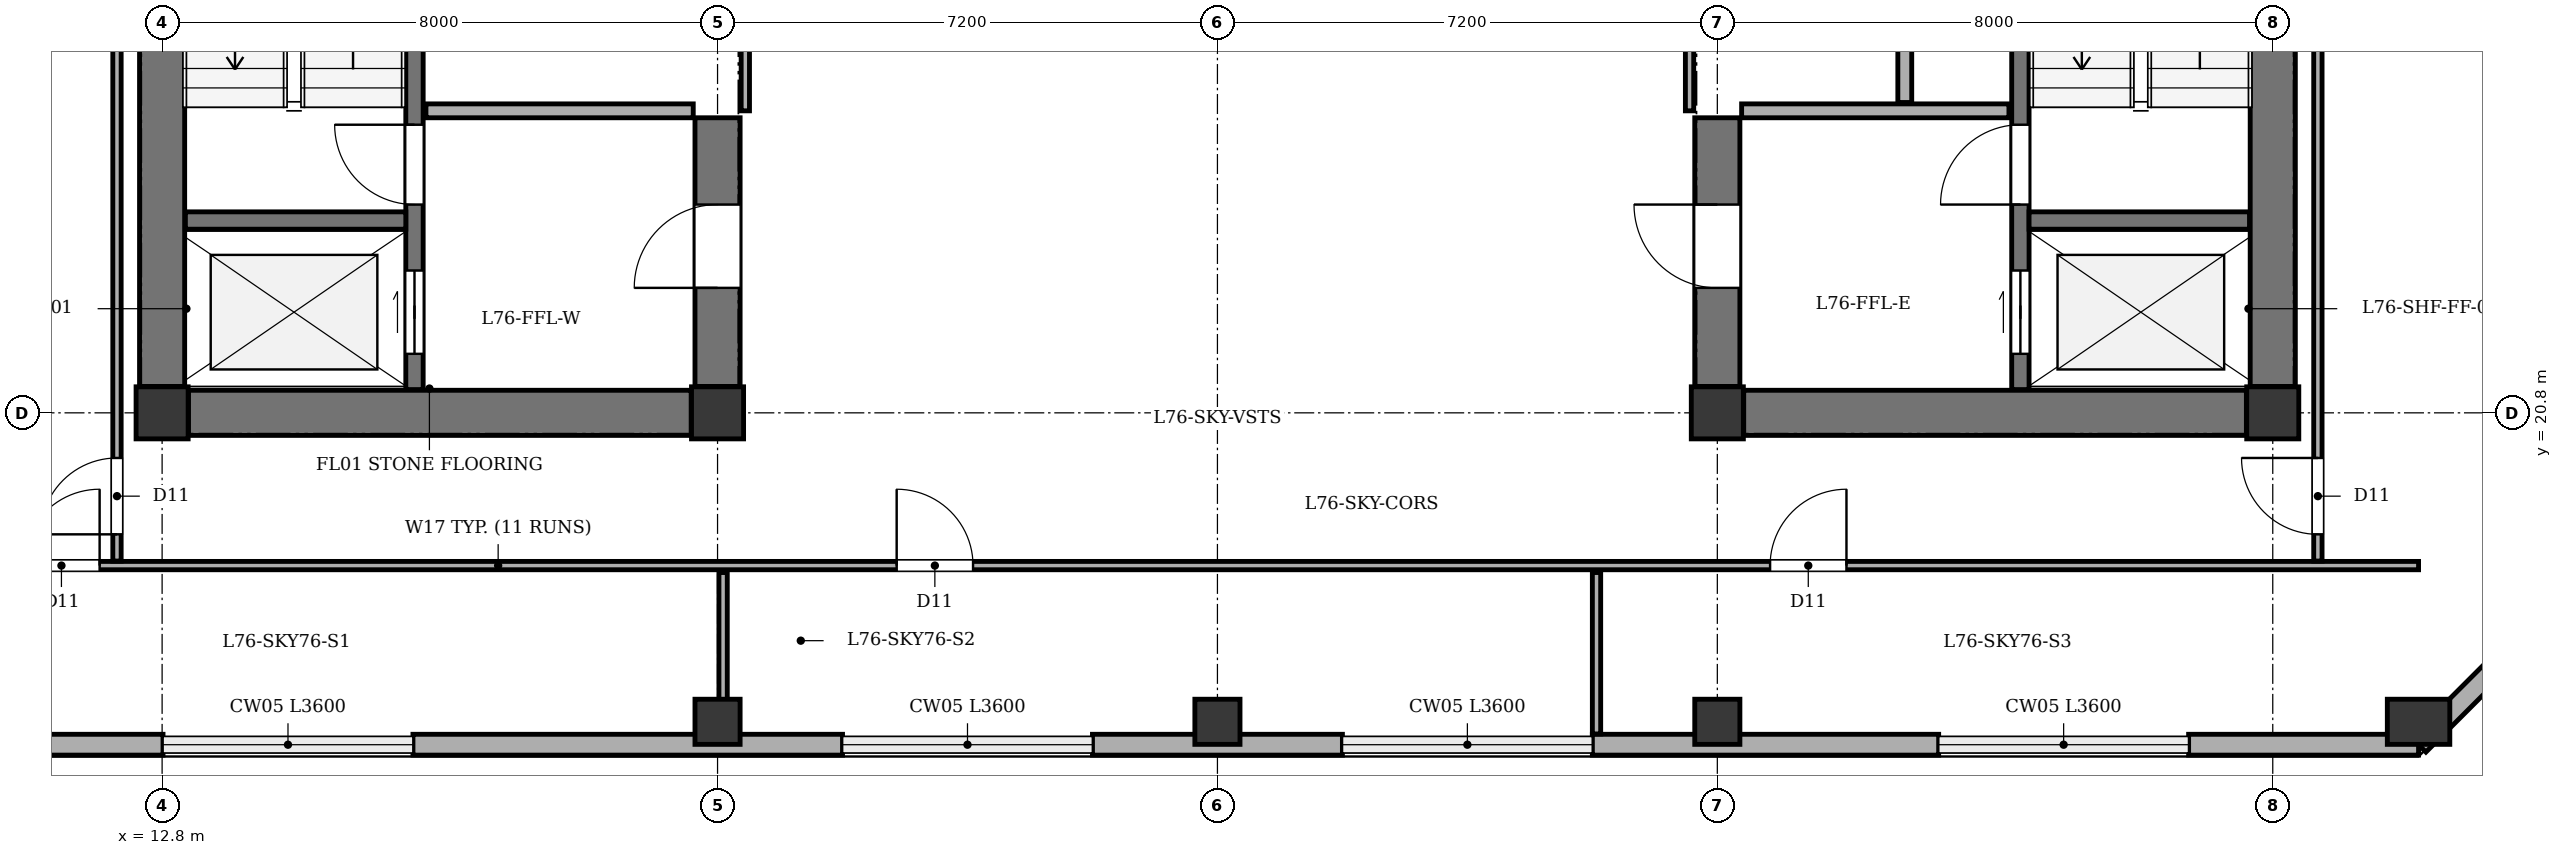
"""IFC4 building model, lengths in metres.
Left out: names, types, materials, properties, quantities, classifications, styles, units other than length and angle.
Written with IfcOpenShell. Run it as: python <this file> out.ifc"""

import sys

from ifc_helpers import new_model, si_unit, direction, frame, frame_2d, origin, origin_2d, place, context, subcontext, project, spatial, rectangle, extrude, element, fill, save


model = new_model("IFC4")
c1 = context("Model", 3, precision=1e-05, world=origin(), true_north=direction((0.0, 1.0)))
c2 = subcontext(c1, "Body", "Model", "MODEL_VIEW")
j1 = project(units=[si_unit("LENGTHUNIT", "METRE"), si_unit("PLANEANGLEUNIT", "RADIAN")], contexts=[c1])
p1 = place(None, origin())
s1 = spatial("IfcSite", under=j1, at=p1, CompositionType="ELEMENT")
p2 = place(p1, origin())
s2 = spatial("IfcBuilding", under=s1, at=p2, CompositionType="ELEMENT")
p3 = place(p2, frame((0.0, 0.0, 287.4)))
s3 = spatial("IfcBuildingStorey", under=s2, at=p3, CompositionType="ELEMENT", Elevation=287.4)
for number, where, z_axis, x_axis in (
    (1, (12.8, 20.8, 0.0), (0.0, 0.0, 1.0), (1.0, 0.0, 0.0)),
    (2, (20.8, 20.8, 0.0), (0.0, 0.0, 1.0), (1.0, 0.0, 0.0)),
    (3, (35.2, 20.8, 0.0), (0.0, 0.0, 1.0), (1.0, 0.0, 0.0)),
    (4, (43.2, 20.8, 0.0), (0.0, 0.0, 1.0), (1.0, 0.0, 0.0)),
):
    element("IfcColumn", number, at=place(p3, frame(where, z_axis=z_axis, x_axis=x_axis)), inside=s3, PredefinedType="COLUMN", context=c2, shape_type="SweptSolid", body=[
        extrude(rectangle(XDim=0.75, YDim=0.75, at=origin_2d()), origin(), (0.0, 0.0, 1.0), 4.8),
    ])
for number, where, z_axis, x_axis in (
    (5, (20.8, 16.35, 0.0), (0.0, 0.0, 1.0), (1.0, 0.0, 0.0)),
    (6, (28.0, 16.35, 0.0), (0.0, 0.0, 1.0), (1.0, 0.0, 0.0)),
    (7, (35.2, 16.35, 0.0), (0.0, 0.0, 1.0), (1.0, 0.0, 0.0)),
):
    element("IfcColumn", number, at=place(p3, frame(where, z_axis=z_axis, x_axis=x_axis)), inside=s3, PredefinedType="COLUMN", context=c2, shape_type="SweptSolid", body=[
        extrude(rectangle(XDim=0.65, YDim=0.65, at=origin_2d()), origin(), (0.0, 0.0, 1.0), 4.8),
    ])
p4 = place(p3, frame((45.3, 16.35, 0.0), z_axis=(0.0, 0.0, 1.0), x_axis=(1.0, 0.0, 0.0)))
e8 = element("IfcColumn", 8, at=p4, inside=s3, PredefinedType="COLUMN", context=c2, shape_type="SweptSolid", body=[
    extrude(rectangle(XDim=0.65, YDim=0.9, at=origin_2d()), origin(), (0.0, 0.0, 1.0), 4.8),
])
p5 = place(p3, frame((45.3, 16.02, 0.0), z_axis=(0.0, 0.0, 1.0), x_axis=(-1.0, 0.0, 0.0)))
e9 = element("IfcWall", 9, at=p5, inside=s3, PredefinedType="STANDARD", context=c2, shape_type="SweptSolid", body=[
    extrude(rectangle(XDim=3.312, YDim=0.3, at=frame_2d((1.656, 0.0))), origin(), (0.0, 0.0, 1.0), 3.735),
])
p6 = place(p3, frame((38.388, 16.02, 0.0), z_axis=(0.0, 0.0, 1.0), x_axis=(-1.0, 0.0, 0.0)))
e10 = element("IfcWall", 10, at=p6, inside=s3, PredefinedType="STANDARD", context=c2, shape_type="SweptSolid", body=[
    extrude(rectangle(XDim=4.988, YDim=0.3, at=frame_2d((2.494, 0.0))), origin(), (0.0, 0.0, 1.0), 3.735),
])
p7 = place(p3, frame((29.8, 16.02, 0.0), z_axis=(0.0, 0.0, 1.0), x_axis=(-1.0, 0.0, 0.0)))
e11 = element("IfcWall", 11, at=p7, inside=s3, PredefinedType="STANDARD", context=c2, shape_type="SweptSolid", body=[
    extrude(rectangle(XDim=3.6, YDim=0.3, at=frame_2d((1.8, 0.0))), origin(), (0.0, 0.0, 1.0), 3.735),
])
p8 = place(p3, frame((22.6, 16.02, 0.0), z_axis=(0.0, 0.0, 1.0), x_axis=(-1.0, 0.0, 0.0)))
e12 = element("IfcWall", 12, at=p8, inside=s3, PredefinedType="STANDARD", context=c2, shape_type="SweptSolid", body=[
    extrude(rectangle(XDim=6.187, YDim=0.3, at=frame_2d((3.094, 0.0))), origin(), (0.0, 0.0, 1.0), 3.735),
])
p9 = place(p3, frame((12.813, 16.02, 0.0), z_axis=(0.0, 0.0, 1.0), x_axis=(-1.0, 0.0, 0.0)))
e13 = element("IfcWall", 13, at=p9, inside=s3, PredefinedType="STANDARD", context=c2, shape_type="SweptSolid", body=[
    extrude(rectangle(XDim=4.513, YDim=0.3, at=frame_2d((2.256, 0.0))), origin(), (0.0, 0.0, 1.0), 3.735),
])
p10 = place(p3, frame((49.13, 19.85, 0.0), z_axis=(0.0, 0.0, 1.0), x_axis=(-0.707084243559, -0.707129318095, 0.0)))
e14 = element("IfcWall", 14, at=p10, inside=s3, PredefinedType="STANDARD", context=c2, shape_type="SweptSolid", body=[
    extrude(rectangle(XDim=5.416, YDim=0.3, at=frame_2d((2.708, 0.0))), origin(), (0.0, 0.0, 1.0), 3.735),
])
p11 = place(p3, frame((12.8, 21.18, 0.0), z_axis=(0.0, 0.0, 1.0), x_axis=(0.0, 1.0, 0.0)))
e15 = element("IfcWall", 15, at=p11, inside=s3, PredefinedType="SHEAR", context=c2, shape_type="SweptSolid", body=[
    extrude(rectangle(XDim=12.04, YDim=0.65, at=frame_2d((6.02, 0.0))), origin(), (0.0, 0.0, 1.0), 4.35),
])
p12 = place(p3, frame((13.18, 20.8, 0.0), z_axis=(0.0, 0.0, 1.0), x_axis=(1.0, 0.0, 0.0)))
e16 = element("IfcWall", 16, at=p12, inside=s3, PredefinedType="SHEAR", context=c2, shape_type="SweptSolid", body=[
    extrude(rectangle(XDim=7.24, YDim=0.65, at=frame_2d((3.62, 0.0))), origin(), (0.0, 0.0, 1.0), 4.35),
])
p13 = place(p3, frame((20.8, 21.18, 0.0), z_axis=(0.0, 0.0, 1.0), x_axis=(0.0, 1.0, 0.0)))
e17 = element("IfcWall", 17, at=p13, inside=s3, PredefinedType="SHEAR", context=c2, shape_type="SweptSolid", body=[
    extrude(rectangle(XDim=3.87, YDim=0.65, at=frame_2d((1.935, 0.0))), origin(), (0.0, 0.0, 1.0), 4.35),
])
p14 = place(p13, frame((1.42, 0.0, 0.0)))
e18 = element("IfcOpeningElement", 18, at=p14, cuts=e17, PredefinedType="OPENING", context=c2, shape_type="SweptSolid", body=[
    extrude(rectangle(XDim=1.2, YDim=2.15, at=frame_2d((0.6, 1.075))), frame((0.0, 0.335, 0.0), z_axis=(0.0, -1.0, 0.0), x_axis=(1.0, 0.0, 0.0)), (0.0, 0.0, 1.0), 0.67),
])
p15 = place(p3, frame((16.435, 21.135, 0.0), z_axis=(0.0, 0.0, 1.0), x_axis=(0.0, 1.0, 0.0)))
e19 = element("IfcWall", 19, at=p15, inside=s3, PredefinedType="SHEAR", context=c2, shape_type="SweptSolid", body=[
    extrude(rectangle(XDim=12.13, YDim=0.25, at=frame_2d((6.065, 0.0))), origin(), (0.0, 0.0, 1.0), 4.35),
])
p16 = place(p15, frame((0.515, 0.0, 0.0)))
e20 = element("IfcOpeningElement", 20, at=p16, cuts=e19, PredefinedType="OPENING", context=c2, shape_type="SweptSolid", body=[
    extrude(rectangle(XDim=1.2, YDim=2.15, at=frame_2d((0.6, 1.075))), frame((0.0, 0.135, 0.0), z_axis=(0.0, -1.0, 0.0), x_axis=(1.0, 0.0, 0.0)), (0.0, 0.0, 1.0), 0.27),
])
p17 = place(p15, frame((2.665, 0.0, 0.0)))
e21 = element("IfcOpeningElement", 21, at=p17, cuts=e19, PredefinedType="OPENING", context=c2, shape_type="SweptSolid", body=[
    extrude(rectangle(XDim=1.15, YDim=2.15, at=frame_2d((0.575, 1.075))), frame((0.0, 0.135, 0.0), z_axis=(0.0, -1.0, 0.0), x_axis=(1.0, 0.0, 0.0)), (0.0, 0.0, 1.0), 0.27),
])
p18 = place(p3, frame((13.135, 23.57, 0.0), z_axis=(0.0, 0.0, 1.0), x_axis=(1.0, 0.0, 0.0)))
e22 = element("IfcWall", 22, at=p18, inside=s3, PredefinedType="SHEAR", context=c2, shape_type="SweptSolid", body=[
    extrude(rectangle(XDim=3.175, YDim=0.25, at=frame_2d((1.587, 0.0))), origin(), (0.0, 0.0, 1.0), 4.35),
])
p19 = place(p3, frame((16.6, 25.15, 0.0), z_axis=(0.0, 0.0, 1.0), x_axis=(1.0, 0.0, 0.0)))
e23 = element("IfcWall", 23, at=p19, inside=s3, PredefinedType="SOLIDWALL", context=c2, shape_type="SweptSolid", body=[
    extrude(rectangle(XDim=3.85, YDim=0.2, at=frame_2d((1.925, 0.0))), origin(), (0.0, 0.0, 1.0), 4.35),
])
p20 = place(p3, frame((43.2, 21.18, 0.0), z_axis=(0.0, 0.0, 1.0), x_axis=(0.0, 1.0, 0.0)))
e24 = element("IfcWall", 24, at=p20, inside=s3, PredefinedType="SHEAR", context=c2, shape_type="SweptSolid", body=[
    extrude(rectangle(XDim=12.04, YDim=0.65, at=frame_2d((6.02, 0.0))), origin(), (0.0, 0.0, 1.0), 4.35),
])
p21 = place(p3, frame((35.58, 20.8, 0.0), z_axis=(0.0, 0.0, 1.0), x_axis=(1.0, 0.0, 0.0)))
e25 = element("IfcWall", 25, at=p21, inside=s3, PredefinedType="SHEAR", context=c2, shape_type="SweptSolid", body=[
    extrude(rectangle(XDim=7.24, YDim=0.65, at=frame_2d((3.62, 0.0))), origin(), (0.0, 0.0, 1.0), 4.35),
])
p22 = place(p3, frame((35.2, 21.18, 0.0), z_axis=(0.0, 0.0, 1.0), x_axis=(0.0, 1.0, 0.0)))
e26 = element("IfcWall", 26, at=p22, inside=s3, PredefinedType="SHEAR", context=c2, shape_type="SweptSolid", body=[
    extrude(rectangle(XDim=3.87, YDim=0.65, at=frame_2d((1.935, 0.0))), origin(), (0.0, 0.0, 1.0), 4.35),
])
p23 = place(p22, frame((1.42, 0.0, 0.0)))
e27 = element("IfcOpeningElement", 27, at=p23, cuts=e26, PredefinedType="OPENING", context=c2, shape_type="SweptSolid", body=[
    extrude(rectangle(XDim=1.2, YDim=2.15, at=frame_2d((0.6, 1.075))), frame((0.0, 0.335, 0.0), z_axis=(0.0, -1.0, 0.0), x_axis=(1.0, 0.0, 0.0)), (0.0, 0.0, 1.0), 0.67),
])
p24 = place(p3, frame((39.565, 21.135, 0.0), z_axis=(0.0, 0.0, 1.0), x_axis=(0.0, 1.0, 0.0)))
e28 = element("IfcWall", 28, at=p24, inside=s3, PredefinedType="SHEAR", context=c2, shape_type="SweptSolid", body=[
    extrude(rectangle(XDim=12.13, YDim=0.25, at=frame_2d((6.065, 0.0))), origin(), (0.0, 0.0, 1.0), 4.35),
])
p25 = place(p24, frame((0.515, 0.0, 0.0)))
e29 = element("IfcOpeningElement", 29, at=p25, cuts=e28, PredefinedType="OPENING", context=c2, shape_type="SweptSolid", body=[
    extrude(rectangle(XDim=1.2, YDim=2.15, at=frame_2d((0.6, 1.075))), frame((0.0, 0.135, 0.0), z_axis=(0.0, -1.0, 0.0), x_axis=(1.0, 0.0, 0.0)), (0.0, 0.0, 1.0), 0.27),
])
p26 = place(p24, frame((2.665, 0.0, 0.0)))
e30 = element("IfcOpeningElement", 30, at=p26, cuts=e28, PredefinedType="OPENING", context=c2, shape_type="SweptSolid", body=[
    extrude(rectangle(XDim=1.15, YDim=2.15, at=frame_2d((0.575, 1.075))), frame((0.0, 0.135, 0.0), z_axis=(0.0, -1.0, 0.0), x_axis=(1.0, 0.0, 0.0)), (0.0, 0.0, 1.0), 0.27),
])
p27 = place(p3, frame((39.69, 23.57, 0.0), z_axis=(0.0, 0.0, 1.0), x_axis=(1.0, 0.0, 0.0)))
e31 = element("IfcWall", 31, at=p27, inside=s3, PredefinedType="SHEAR", context=c2, shape_type="SweptSolid", body=[
    extrude(rectangle(XDim=3.175, YDim=0.25, at=frame_2d((1.587, 0.0))), origin(), (0.0, 0.0, 1.0), 4.35),
])
p28 = place(p3, frame((35.55, 25.15, 0.0), z_axis=(0.0, 0.0, 1.0), x_axis=(1.0, 0.0, 0.0)))
e32 = element("IfcWall", 32, at=p28, inside=s3, PredefinedType="SOLIDWALL", context=c2, shape_type="SweptSolid", body=[
    extrude(rectangle(XDim=3.85, YDim=0.2, at=frame_2d((1.925, 0.0))), origin(), (0.0, 0.0, 1.0), 4.35),
])
p29 = place(p3, frame((37.9, 25.27, 0.0), z_axis=(0.0, 0.0, 1.0), x_axis=(0.0, 1.0, 0.0)))
e33 = element("IfcWall", 33, at=p29, inside=s3, PredefinedType="SOLIDWALL", context=c2, shape_type="SweptSolid", body=[
    extrude(rectangle(XDim=7.995, YDim=0.2, at=frame_2d((3.998, 0.0))), origin(), (0.0, 0.0, 1.0), 4.35),
])
p30 = place(p3, frame((21.2, 25.15, 0.0), z_axis=(0.0, 0.0, 1.0), x_axis=(0.0, 1.0, 0.0)))
e34 = element("IfcWall", 34, at=p30, inside=s3, PredefinedType="PARTITIONING", context=c2, shape_type="SweptSolid", body=[
    extrude(rectangle(XDim=5.95, YDim=0.12, at=frame_2d((2.975, 0.0))), origin(), (0.0, 0.0, 1.0), 4.35),
])
p31 = place(p30, frame((2.2, 0.0, 0.0)))
e35 = element("IfcOpeningElement", 35, at=p31, cuts=e34, PredefinedType="OPENING", context=c2, shape_type="SweptSolid", body=[
    extrude(rectangle(XDim=1.0, YDim=2.1, at=frame_2d((0.5, 1.05))), frame((0.0, 0.07, 0.0), z_axis=(0.0, -1.0, 0.0), x_axis=(1.0, 0.0, 0.0)), (0.0, 0.0, 1.0), 0.14),
])
p32 = place(p3, frame((34.8, 25.15, 0.0), z_axis=(0.0, 0.0, 1.0), x_axis=(0.0, 1.0, 0.0)))
e36 = element("IfcWall", 36, at=p32, inside=s3, PredefinedType="PARTITIONING", context=c2, shape_type="SweptSolid", body=[
    extrude(rectangle(XDim=5.95, YDim=0.12, at=frame_2d((2.975, 0.0))), origin(), (0.0, 0.0, 1.0), 4.35),
])
p33 = place(p32, frame((2.2, 0.0, 0.0)))
e37 = element("IfcOpeningElement", 37, at=p33, cuts=e36, PredefinedType="OPENING", context=c2, shape_type="SweptSolid", body=[
    extrude(rectangle(XDim=1.0, YDim=2.1, at=frame_2d((0.5, 1.05))), frame((0.0, 0.07, 0.0), z_axis=(0.0, -1.0, 0.0), x_axis=(1.0, 0.0, 0.0)), (0.0, 0.0, 1.0), 0.14),
])
p34 = place(p3, frame((8.3, 18.6, 0.0), z_axis=(0.0, 0.0, 1.0), x_axis=(1.0, 0.0, 0.0)))
e38 = element("IfcWall", 38, at=p34, inside=s3, PredefinedType="PARTITIONING", context=c2, shape_type="SweptSolid", body=[
    extrude(rectangle(XDim=37.0, YDim=0.12, at=frame_2d((18.5, 0.0))), origin(), (0.0, 0.0, 1.0), 4.35),
])
p35 = place(p34, frame((2.5, 0.0, 0.0)))
e39 = element("IfcOpeningElement", 39, at=p35, cuts=e38, PredefinedType="OPENING", context=c2, shape_type="SweptSolid", body=[
    extrude(rectangle(XDim=1.1, YDim=2.15, at=frame_2d((0.55, 1.075))), frame((0.0, 0.07, 0.0), z_axis=(0.0, -1.0, 0.0), x_axis=(1.0, 0.0, 0.0)), (0.0, 0.0, 1.0), 0.14),
])
p36 = place(p34, frame((15.08, 0.0, 0.0)))
e40 = element("IfcOpeningElement", 40, at=p36, cuts=e38, PredefinedType="OPENING", context=c2, shape_type="SweptSolid", body=[
    extrude(rectangle(XDim=1.1, YDim=2.15, at=frame_2d((0.55, 1.075))), frame((0.0, 0.07, 0.0), z_axis=(0.0, -1.0, 0.0), x_axis=(1.0, 0.0, 0.0)), (0.0, 0.0, 1.0), 0.14),
])
p37 = place(p34, frame((27.66, 0.0, 0.0)))
e41 = element("IfcOpeningElement", 41, at=p37, cuts=e38, PredefinedType="OPENING", context=c2, shape_type="SweptSolid", body=[
    extrude(rectangle(XDim=1.1, YDim=2.15, at=frame_2d((0.55, 1.075))), frame((0.0, 0.07, 0.0), z_axis=(0.0, -1.0, 0.0), x_axis=(1.0, 0.0, 0.0)), (0.0, 0.0, 1.0), 0.14),
])
p38 = place(p3, frame((20.88, 16.175, 0.0), z_axis=(0.0, 0.0, 1.0), x_axis=(0.0, 1.0, 0.0)))
e42 = element("IfcWall", 42, at=p38, inside=s3, PredefinedType="PARTITIONING", context=c2, shape_type="SweptSolid", body=[
    extrude(rectangle(XDim=2.325, YDim=0.12, at=frame_2d((1.163, 0.0))), origin(), (0.0, 0.0, 1.0), 3.535),
])
p39 = place(p3, frame((33.46, 16.175, 0.0), z_axis=(0.0, 0.0, 1.0), x_axis=(0.0, 1.0, 0.0)))
e43 = element("IfcWall", 43, at=p39, inside=s3, PredefinedType="PARTITIONING", context=c2, shape_type="SweptSolid", body=[
    extrude(rectangle(XDim=2.325, YDim=0.12, at=frame_2d((1.163, 0.0))), origin(), (0.0, 0.0, 1.0), 4.35),
])
p40 = place(p3, frame((12.15, 18.665, 0.0), z_axis=(0.0, 0.0, 1.0), x_axis=(0.0, 1.0, 0.0)))
e44 = element("IfcWall", 44, at=p40, inside=s3, PredefinedType="PARTITIONING", context=c2, shape_type="SweptSolid", body=[
    extrude(rectangle(XDim=17.47, YDim=0.12, at=frame_2d((8.735, 0.0))), origin(), (0.0, 0.0, 1.0), 4.35),
])
p41 = place(p40, frame((0.385, 0.0, 0.0)))
e45 = element("IfcOpeningElement", 45, at=p41, cuts=e44, PredefinedType="OPENING", context=c2, shape_type="SweptSolid", body=[
    extrude(rectangle(XDim=1.1, YDim=2.15, at=frame_2d((0.55, 1.075))), frame((0.0, 0.07, 0.0), z_axis=(0.0, -1.0, 0.0), x_axis=(1.0, 0.0, 0.0)), (0.0, 0.0, 1.0), 0.14),
])
p42 = place(p3, frame((43.85, 18.665, 0.0), z_axis=(0.0, 0.0, 1.0), x_axis=(0.0, 1.0, 0.0)))
e46 = element("IfcWall", 46, at=p42, inside=s3, PredefinedType="PARTITIONING", context=c2, shape_type="SweptSolid", body=[
    extrude(rectangle(XDim=17.47, YDim=0.12, at=frame_2d((8.735, 0.0))), origin(), (0.0, 0.0, 1.0), 4.35),
])
p43 = place(p42, frame((0.385, 0.0, 0.0)))
e47 = element("IfcOpeningElement", 47, at=p43, cuts=e46, PredefinedType="OPENING", context=c2, shape_type="SweptSolid", body=[
    extrude(rectangle(XDim=1.1, YDim=2.15, at=frame_2d((0.55, 1.075))), frame((0.0, 0.07, 0.0), z_axis=(0.0, -1.0, 0.0), x_axis=(1.0, 0.0, 0.0)), (0.0, 0.0, 1.0), 0.14),
])
p44 = place(p14, origin())
e48 = element("IfcDoor", 48, at=p44, inside=s3, OperationType="SINGLE_SWING_LEFT", PredefinedType="DOOR", context=c2, shape_type="SweptSolid", body=[
    extrude(rectangle(XDim=1.2, YDim=2.15, at=frame_2d((0.6, 1.075))), frame((0.0, 0.025, 0.0), z_axis=(0.0, -1.0, 0.0), x_axis=(1.0, 0.0, 0.0)), (0.0, 0.0, 1.0), 0.05),
])
fill(e18, e48)
p45 = place(p16, origin())
e49 = element("IfcDoor", 49, at=p45, inside=s3, OperationType="DOUBLE_DOOR_SLIDING", PredefinedType="DOOR", context=c2, shape_type="SweptSolid", body=[
    extrude(rectangle(XDim=1.2, YDim=2.15, at=frame_2d((0.6, 1.075))), frame((0.0, 0.025, 0.0), z_axis=(0.0, -1.0, 0.0), x_axis=(1.0, 0.0, 0.0)), (0.0, 0.0, 1.0), 0.05),
])
fill(e20, e49)
p46 = place(p17, origin())
e50 = element("IfcDoor", 50, at=p46, inside=s3, OperationType="SINGLE_SWING_RIGHT", PredefinedType="DOOR", context=c2, shape_type="SweptSolid", body=[
    extrude(rectangle(XDim=1.15, YDim=2.15, at=frame_2d((0.575, 1.075))), frame((0.0, 0.025, 0.0), z_axis=(0.0, -1.0, 0.0), x_axis=(1.0, 0.0, 0.0)), (0.0, 0.0, 1.0), 0.05),
])
fill(e21, e50)
p47 = place(p23, origin())
e51 = element("IfcDoor", 51, at=p47, inside=s3, OperationType="SINGLE_SWING_RIGHT", PredefinedType="DOOR", context=c2, shape_type="SweptSolid", body=[
    extrude(rectangle(XDim=1.2, YDim=2.15, at=frame_2d((0.6, 1.075))), frame((0.0, 0.025, 0.0), z_axis=(0.0, -1.0, 0.0), x_axis=(1.0, 0.0, 0.0)), (0.0, 0.0, 1.0), 0.05),
])
fill(e27, e51)
p48 = place(p25, origin())
e52 = element("IfcDoor", 52, at=p48, inside=s3, OperationType="DOUBLE_DOOR_SLIDING", PredefinedType="DOOR", context=c2, shape_type="SweptSolid", body=[
    extrude(rectangle(XDim=1.2, YDim=2.15, at=frame_2d((0.6, 1.075))), frame((0.0, 0.025, 0.0), z_axis=(0.0, -1.0, 0.0), x_axis=(1.0, 0.0, 0.0)), (0.0, 0.0, 1.0), 0.05),
])
fill(e29, e52)
p49 = place(p26, origin())
e53 = element("IfcDoor", 53, at=p49, inside=s3, OperationType="SINGLE_SWING_LEFT", PredefinedType="DOOR", context=c2, shape_type="SweptSolid", body=[
    extrude(rectangle(XDim=1.15, YDim=2.15, at=frame_2d((0.575, 1.075))), frame((0.0, 0.025, 0.0), z_axis=(0.0, -1.0, 0.0), x_axis=(1.0, 0.0, 0.0)), (0.0, 0.0, 1.0), 0.05),
])
fill(e30, e53)
p50 = place(p35, origin())
e54 = element("IfcDoor", 54, at=p50, inside=s3, OperationType="SINGLE_SWING_RIGHT", PredefinedType="DOOR", context=c2, shape_type="SweptSolid", body=[
    extrude(rectangle(XDim=1.1, YDim=2.15, at=frame_2d((0.55, 1.075))), frame((0.0, 0.025, 0.0), z_axis=(0.0, -1.0, 0.0), x_axis=(1.0, 0.0, 0.0)), (0.0, 0.0, 1.0), 0.05),
])
fill(e39, e54)
p51 = place(p36, origin())
e55 = element("IfcDoor", 55, at=p51, inside=s3, OperationType="SINGLE_SWING_LEFT", PredefinedType="DOOR", context=c2, shape_type="SweptSolid", body=[
    extrude(rectangle(XDim=1.1, YDim=2.15, at=frame_2d((0.55, 1.075))), frame((0.0, 0.025, 0.0), z_axis=(0.0, -1.0, 0.0), x_axis=(1.0, 0.0, 0.0)), (0.0, 0.0, 1.0), 0.05),
])
fill(e40, e55)
p52 = place(p37, origin())
e56 = element("IfcDoor", 56, at=p52, inside=s3, OperationType="SINGLE_SWING_RIGHT", PredefinedType="DOOR", context=c2, shape_type="SweptSolid", body=[
    extrude(rectangle(XDim=1.1, YDim=2.15, at=frame_2d((0.55, 1.075))), frame((0.0, 0.025, 0.0), z_axis=(0.0, -1.0, 0.0), x_axis=(1.0, 0.0, 0.0)), (0.0, 0.0, 1.0), 0.05),
])
fill(e41, e56)
p53 = place(p41, origin())
e57 = element("IfcDoor", 57, at=p53, inside=s3, OperationType="SINGLE_SWING_LEFT", PredefinedType="DOOR", context=c2, shape_type="SweptSolid", body=[
    extrude(rectangle(XDim=1.1, YDim=2.15, at=frame_2d((0.55, 1.075))), frame((0.0, 0.025, 0.0), z_axis=(0.0, -1.0, 0.0), x_axis=(1.0, 0.0, 0.0)), (0.0, 0.0, 1.0), 0.05),
])
fill(e45, e57)
p54 = place(p43, origin())
e58 = element("IfcDoor", 58, at=p54, inside=s3, OperationType="SINGLE_SWING_RIGHT", PredefinedType="DOOR", context=c2, shape_type="SweptSolid", body=[
    extrude(rectangle(XDim=1.1, YDim=2.15, at=frame_2d((0.55, 1.075))), frame((0.0, 0.025, 0.0), z_axis=(0.0, -1.0, 0.0), x_axis=(1.0, 0.0, 0.0)), (0.0, 0.0, 1.0), 0.05),
])
fill(e47, e58)
save(model, sys.argv[1])
